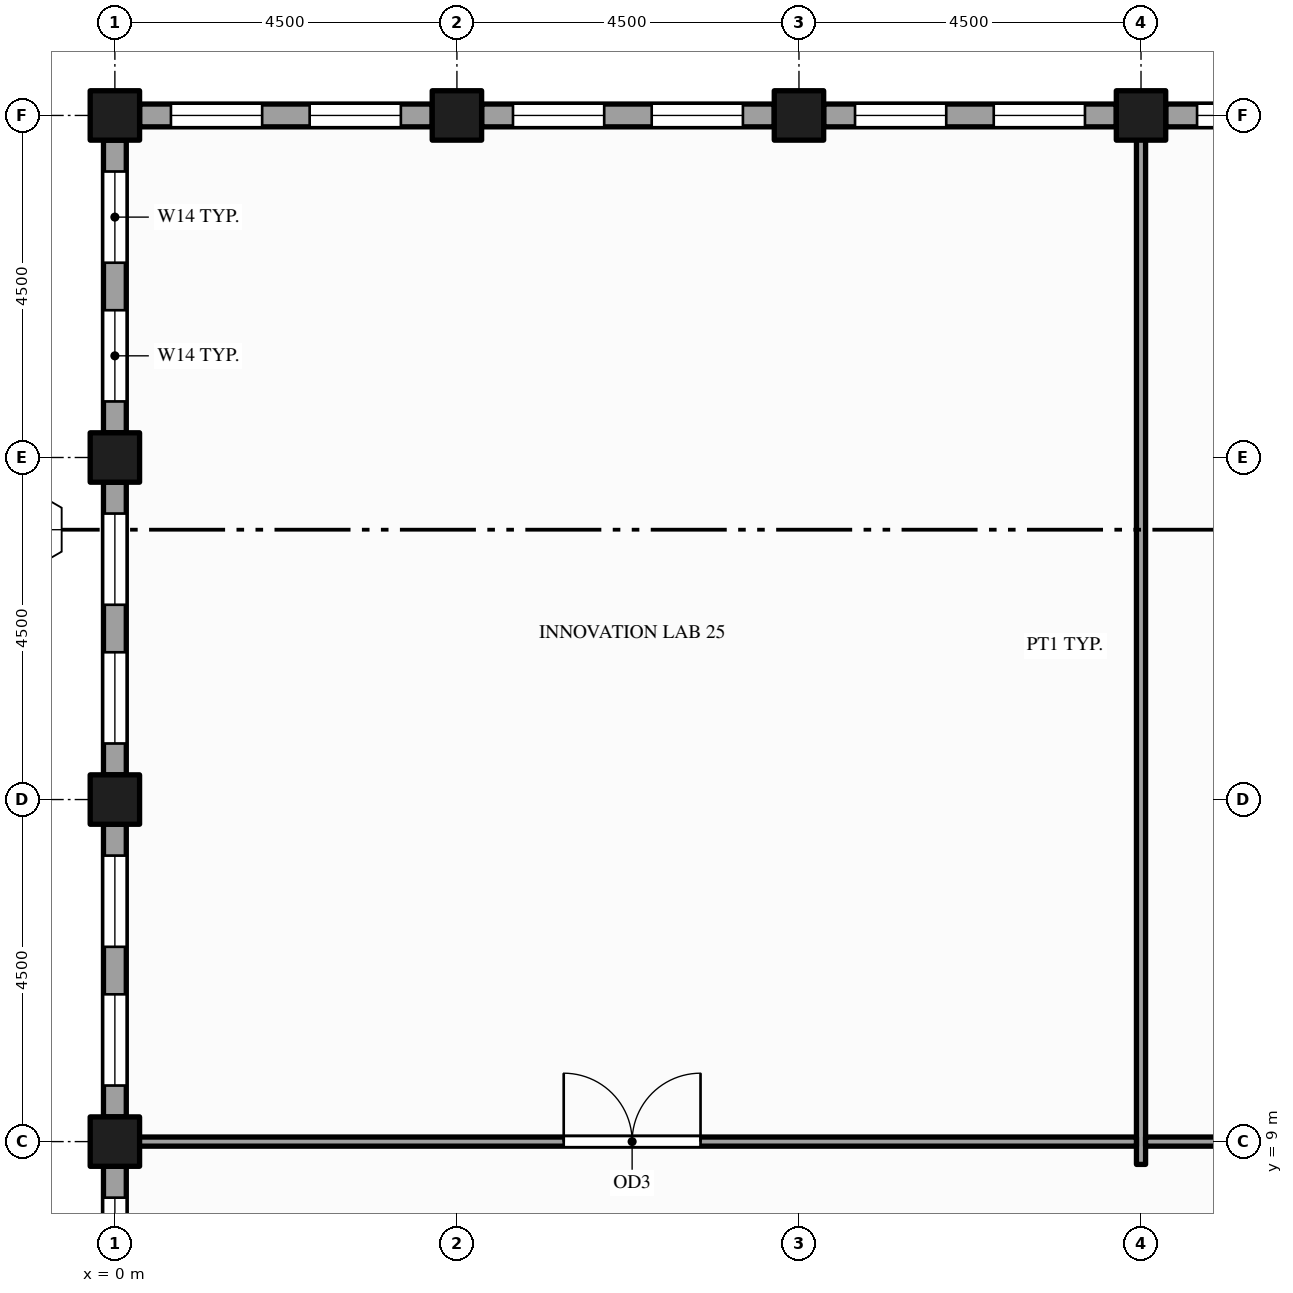
"""IFC4 building model, lengths in metres.
Left out: names, types, materials, properties, quantities, classifications, styles, units other than length and angle.
Written with IfcOpenShell. Run it as: python <this file> out.ifc"""

import sys

from ifc_helpers import new_model, si_unit, direction, frame, frame_2d, origin, origin_2d, place, context, subcontext, project, spatial, rectangle, hollow_rectangle, extrude, element, fill, save


model = new_model("IFC4")
c1 = context("Model", 3, precision=1e-05, world=origin(), true_north=direction((0.0, 1.0)))
c2 = subcontext(c1, "Body", "Model", "MODEL_VIEW")
j1 = project(units=[si_unit("LENGTHUNIT", "METRE"), si_unit("PLANEANGLEUNIT", "RADIAN")], contexts=[c1])
p1 = place(None, origin())
s1 = spatial("IfcSite", under=j1, at=p1, CompositionType="ELEMENT")
p2 = place(p1, origin())
s2 = spatial("IfcBuilding", under=s1, at=p2, CompositionType="ELEMENT")
p3 = place(p2, frame((0.0, 0.0, 273.0)))
s3 = spatial("IfcBuildingStorey", under=s2, at=p3, CompositionType="ELEMENT", Elevation=273.0)
for number, where, z_axis, x_axis in (
    (1, (0.0, 9.0, -0.15), (0.0, 0.0, 1.0), (1.0, 0.0, 0.0)),
    (2, (0.0, 13.5, -0.15), (0.0, 0.0, 1.0), (1.0, 0.0, 0.0)),
    (3, (0.0, 18.0, -0.15), (0.0, 0.0, 1.0), (1.0, 0.0, 0.0)),
    (4, (0.0, 22.5, -0.15), (0.0, 0.0, 1.0), (1.0, 0.0, 0.0)),
    (5, (4.5, 22.5, -0.15), (0.0, 0.0, 1.0), (1.0, 0.0, 0.0)),
    (6, (9.0, 22.5, -0.15), (0.0, 0.0, 1.0), (1.0, 0.0, 0.0)),
    (7, (13.5, 22.5, -0.15), (0.0, 0.0, 1.0), (1.0, 0.0, 0.0)),
):
    element("IfcColumn", number, at=place(p3, frame(where, z_axis=z_axis, x_axis=x_axis)), inside=s3, PredefinedType="COLUMN", context=c2, shape_type="SweptSolid", body=[
        extrude(hollow_rectangle(XDim=0.65, YDim=0.65, WallThickness=0.032, at=origin_2d()), origin(), (0.0, 0.0, 1.0), 4.0),
    ])
p4 = place(p3, frame((17.675, 22.5, 0.0), z_axis=(0.0, 0.0, 1.0), x_axis=(-1.0, 0.0, 0.0)))
e8 = element("IfcWall", 8, at=p4, inside=s3, PredefinedType="STANDARD", context=c2, shape_type="SweptSolid", body=[
    extrude(rectangle(XDim=3.85, YDim=0.3, at=frame_2d((1.925, 0.0))), origin(), (0.0, 0.0, 1.0), 2.87),
])
p5 = place(p4, frame((0.413, 0.0, 0.9)))
e9 = element("IfcOpeningElement", 9, at=p5, cuts=e8, PredefinedType="OPENING", context=c2, shape_type="SweptSolid", body=[
    extrude(rectangle(XDim=1.2, YDim=1.75, at=frame_2d((0.6, 0.875))), frame((0.0, 0.16, 0.0), z_axis=(0.0, -1.0, 0.0), x_axis=(1.0, 0.0, 0.0)), (0.0, 0.0, 1.0), 0.32),
])
p6 = place(p4, frame((2.238, 0.0, 0.9)))
e10 = element("IfcOpeningElement", 10, at=p6, cuts=e8, PredefinedType="OPENING", context=c2, shape_type="SweptSolid", body=[
    extrude(rectangle(XDim=1.2, YDim=1.75, at=frame_2d((0.6, 0.875))), frame((0.0, 0.16, 0.0), z_axis=(0.0, -1.0, 0.0), x_axis=(1.0, 0.0, 0.0)), (0.0, 0.0, 1.0), 0.32),
])
p7 = place(p3, frame((13.175, 22.5, 0.0), z_axis=(0.0, 0.0, 1.0), x_axis=(-1.0, 0.0, 0.0)))
e11 = element("IfcWall", 11, at=p7, inside=s3, PredefinedType="STANDARD", context=c2, shape_type="SweptSolid", body=[
    extrude(rectangle(XDim=3.85, YDim=0.3, at=frame_2d((1.925, 0.0))), origin(), (0.0, 0.0, 1.0), 2.87),
])
p8 = place(p7, frame((0.413, 0.0, 0.9)))
e12 = element("IfcOpeningElement", 12, at=p8, cuts=e11, PredefinedType="OPENING", context=c2, shape_type="SweptSolid", body=[
    extrude(rectangle(XDim=1.2, YDim=1.75, at=frame_2d((0.6, 0.875))), frame((0.0, 0.16, 0.0), z_axis=(0.0, -1.0, 0.0), x_axis=(1.0, 0.0, 0.0)), (0.0, 0.0, 1.0), 0.32),
])
p9 = place(p7, frame((2.238, 0.0, 0.9)))
e13 = element("IfcOpeningElement", 13, at=p9, cuts=e11, PredefinedType="OPENING", context=c2, shape_type="SweptSolid", body=[
    extrude(rectangle(XDim=1.2, YDim=1.75, at=frame_2d((0.6, 0.875))), frame((0.0, 0.16, 0.0), z_axis=(0.0, -1.0, 0.0), x_axis=(1.0, 0.0, 0.0)), (0.0, 0.0, 1.0), 0.32),
])
p10 = place(p3, frame((8.675, 22.5, 0.0), z_axis=(0.0, 0.0, 1.0), x_axis=(-1.0, 0.0, 0.0)))
e14 = element("IfcWall", 14, at=p10, inside=s3, PredefinedType="STANDARD", context=c2, shape_type="SweptSolid", body=[
    extrude(rectangle(XDim=3.85, YDim=0.3, at=frame_2d((1.925, 0.0))), origin(), (0.0, 0.0, 1.0), 2.87),
])
p11 = place(p10, frame((0.413, 0.0, 0.9)))
e15 = element("IfcOpeningElement", 15, at=p11, cuts=e14, PredefinedType="OPENING", context=c2, shape_type="SweptSolid", body=[
    extrude(rectangle(XDim=1.2, YDim=1.75, at=frame_2d((0.6, 0.875))), frame((0.0, 0.16, 0.0), z_axis=(0.0, -1.0, 0.0), x_axis=(1.0, 0.0, 0.0)), (0.0, 0.0, 1.0), 0.32),
])
p12 = place(p10, frame((2.238, 0.0, 0.9)))
e16 = element("IfcOpeningElement", 16, at=p12, cuts=e14, PredefinedType="OPENING", context=c2, shape_type="SweptSolid", body=[
    extrude(rectangle(XDim=1.2, YDim=1.75, at=frame_2d((0.6, 0.875))), frame((0.0, 0.16, 0.0), z_axis=(0.0, -1.0, 0.0), x_axis=(1.0, 0.0, 0.0)), (0.0, 0.0, 1.0), 0.32),
])
p13 = place(p3, frame((4.175, 22.5, 0.0), z_axis=(0.0, 0.0, 1.0), x_axis=(-1.0, 0.0, 0.0)))
e17 = element("IfcWall", 17, at=p13, inside=s3, PredefinedType="STANDARD", context=c2, shape_type="SweptSolid", body=[
    extrude(rectangle(XDim=3.85, YDim=0.3, at=frame_2d((1.925, 0.0))), origin(), (0.0, 0.0, 1.0), 2.87),
])
p14 = place(p13, frame((0.413, 0.0, 0.9)))
e18 = element("IfcOpeningElement", 18, at=p14, cuts=e17, PredefinedType="OPENING", context=c2, shape_type="SweptSolid", body=[
    extrude(rectangle(XDim=1.2, YDim=1.75, at=frame_2d((0.6, 0.875))), frame((0.0, 0.16, 0.0), z_axis=(0.0, -1.0, 0.0), x_axis=(1.0, 0.0, 0.0)), (0.0, 0.0, 1.0), 0.32),
])
p15 = place(p13, frame((2.238, 0.0, 0.9)))
e19 = element("IfcOpeningElement", 19, at=p15, cuts=e17, PredefinedType="OPENING", context=c2, shape_type="SweptSolid", body=[
    extrude(rectangle(XDim=1.2, YDim=1.75, at=frame_2d((0.6, 0.875))), frame((0.0, 0.16, 0.0), z_axis=(0.0, -1.0, 0.0), x_axis=(1.0, 0.0, 0.0)), (0.0, 0.0, 1.0), 0.32),
])
p16 = place(p3, frame((0.0, 22.175, 0.0), z_axis=(0.0, 0.0, 1.0), x_axis=(0.0, -1.0, 0.0)))
e20 = element("IfcWall", 20, at=p16, inside=s3, PredefinedType="STANDARD", context=c2, shape_type="SweptSolid", body=[
    extrude(rectangle(XDim=3.85, YDim=0.3, at=frame_2d((1.925, 0.0))), origin(), (0.0, 0.0, 1.0), 3.162),
])
p17 = place(p16, frame((0.413, 0.0, 0.9)))
e21 = element("IfcOpeningElement", 21, at=p17, cuts=e20, PredefinedType="OPENING", context=c2, shape_type="SweptSolid", body=[
    extrude(rectangle(XDim=1.2, YDim=2.0, at=frame_2d((0.6, 1.0))), frame((0.0, 0.16, 0.0), z_axis=(0.0, -1.0, 0.0), x_axis=(1.0, 0.0, 0.0)), (0.0, 0.0, 1.0), 0.32),
])
p18 = place(p16, frame((2.238, 0.0, 0.9)))
e22 = element("IfcOpeningElement", 22, at=p18, cuts=e20, PredefinedType="OPENING", context=c2, shape_type="SweptSolid", body=[
    extrude(rectangle(XDim=1.2, YDim=2.0, at=frame_2d((0.6, 1.0))), frame((0.0, 0.16, 0.0), z_axis=(0.0, -1.0, 0.0), x_axis=(1.0, 0.0, 0.0)), (0.0, 0.0, 1.0), 0.32),
])
p19 = place(p3, frame((0.0, 17.675, 0.0), z_axis=(0.0, 0.0, 1.0), x_axis=(0.0, -1.0, 0.0)))
e23 = element("IfcWall", 23, at=p19, inside=s3, PredefinedType="STANDARD", context=c2, shape_type="SweptSolid", body=[
    extrude(rectangle(XDim=3.85, YDim=0.3, at=frame_2d((1.925, 0.0))), origin(), (0.0, 0.0, 1.0), 3.162),
])
p20 = place(p19, frame((0.413, 0.0, 0.9)))
e24 = element("IfcOpeningElement", 24, at=p20, cuts=e23, PredefinedType="OPENING", context=c2, shape_type="SweptSolid", body=[
    extrude(rectangle(XDim=1.2, YDim=2.0, at=frame_2d((0.6, 1.0))), frame((0.0, 0.16, 0.0), z_axis=(0.0, -1.0, 0.0), x_axis=(1.0, 0.0, 0.0)), (0.0, 0.0, 1.0), 0.32),
])
p21 = place(p19, frame((2.238, 0.0, 0.9)))
e25 = element("IfcOpeningElement", 25, at=p21, cuts=e23, PredefinedType="OPENING", context=c2, shape_type="SweptSolid", body=[
    extrude(rectangle(XDim=1.2, YDim=2.0, at=frame_2d((0.6, 1.0))), frame((0.0, 0.16, 0.0), z_axis=(0.0, -1.0, 0.0), x_axis=(1.0, 0.0, 0.0)), (0.0, 0.0, 1.0), 0.32),
])
p22 = place(p3, frame((0.0, 13.175, 0.0), z_axis=(0.0, 0.0, 1.0), x_axis=(0.0, -1.0, 0.0)))
e26 = element("IfcWall", 26, at=p22, inside=s3, PredefinedType="STANDARD", context=c2, shape_type="SweptSolid", body=[
    extrude(rectangle(XDim=3.85, YDim=0.3, at=frame_2d((1.925, 0.0))), origin(), (0.0, 0.0, 1.0), 3.162),
])
p23 = place(p22, frame((0.413, 0.0, 0.9)))
e27 = element("IfcOpeningElement", 27, at=p23, cuts=e26, PredefinedType="OPENING", context=c2, shape_type="SweptSolid", body=[
    extrude(rectangle(XDim=1.2, YDim=2.0, at=frame_2d((0.6, 1.0))), frame((0.0, 0.16, 0.0), z_axis=(0.0, -1.0, 0.0), x_axis=(1.0, 0.0, 0.0)), (0.0, 0.0, 1.0), 0.32),
])
p24 = place(p22, frame((2.238, 0.0, 0.9)))
e28 = element("IfcOpeningElement", 28, at=p24, cuts=e26, PredefinedType="OPENING", context=c2, shape_type="SweptSolid", body=[
    extrude(rectangle(XDim=1.2, YDim=2.0, at=frame_2d((0.6, 1.0))), frame((0.0, 0.16, 0.0), z_axis=(0.0, -1.0, 0.0), x_axis=(1.0, 0.0, 0.0)), (0.0, 0.0, 1.0), 0.32),
])
p25 = place(p3, frame((0.0, 8.675, 0.0), z_axis=(0.0, 0.0, 1.0), x_axis=(0.0, -1.0, 0.0)))
e29 = element("IfcWall", 29, at=p25, inside=s3, PredefinedType="STANDARD", context=c2, shape_type="SweptSolid", body=[
    extrude(rectangle(XDim=3.85, YDim=0.3, at=frame_2d((1.925, 0.0))), origin(), (0.0, 0.0, 1.0), 3.162),
])
p26 = place(p25, frame((0.413, 0.0, 0.9)))
e30 = element("IfcOpeningElement", 30, at=p26, cuts=e29, PredefinedType="OPENING", context=c2, shape_type="SweptSolid", body=[
    extrude(rectangle(XDim=1.2, YDim=2.0, at=frame_2d((0.6, 1.0))), frame((0.0, 0.16, 0.0), z_axis=(0.0, -1.0, 0.0), x_axis=(1.0, 0.0, 0.0)), (0.0, 0.0, 1.0), 0.32),
])
p27 = place(p25, frame((2.238, 0.0, 0.9)))
e31 = element("IfcOpeningElement", 31, at=p27, cuts=e29, PredefinedType="OPENING", context=c2, shape_type="SweptSolid", body=[
    extrude(rectangle(XDim=1.2, YDim=2.0, at=frame_2d((0.6, 1.0))), frame((0.0, 0.16, 0.0), z_axis=(0.0, -1.0, 0.0), x_axis=(1.0, 0.0, 0.0)), (0.0, 0.0, 1.0), 0.32),
])
p28 = place(p3, frame((13.5, 8.7, 0.0), z_axis=(0.0, 0.0, 1.0), x_axis=(0.0, 1.0, 0.0)))
e32 = element("IfcWall", 32, at=p28, inside=s3, PredefinedType="PARTITIONING", context=c2, shape_type="SweptSolid", body=[
    extrude(rectangle(XDim=13.65, YDim=0.12, at=frame_2d((6.825, 0.0))), origin(), (0.0, 0.0, 1.0), 2.87),
])
p29 = place(p3, frame((0.15, 9.0, 0.0), z_axis=(0.0, 0.0, 1.0), x_axis=(1.0, 0.0, 0.0)))
e33 = element("IfcWall", 33, at=p29, inside=s3, PredefinedType="PARTITIONING", context=c2, shape_type="SweptSolid", body=[
    extrude(rectangle(XDim=13.29, YDim=0.12, at=frame_2d((6.645, 0.0))), origin(), (0.0, 0.0, 1.0), 2.87),
])
p30 = place(p29, frame((5.755, 0.0, 0.0)))
e34 = element("IfcOpeningElement", 34, at=p30, cuts=e33, PredefinedType="OPENING", context=c2, shape_type="SweptSolid", body=[
    extrude(rectangle(XDim=1.8, YDim=2.1, at=frame_2d((0.9, 1.05))), frame((0.0, 0.07, 0.0), z_axis=(0.0, -1.0, 0.0), x_axis=(1.0, 0.0, 0.0)), (0.0, 0.0, 1.0), 0.14),
])
p31 = place(p3, frame((13.56, 9.0, 0.0), z_axis=(0.0, 0.0, 1.0), x_axis=(1.0, 0.0, 0.0)))
e35 = element("IfcWall", 35, at=p31, inside=s3, PredefinedType="PARTITIONING", context=c2, shape_type="SweptSolid", body=[
    extrude(rectangle(XDim=6.63, YDim=0.12, at=frame_2d((3.315, 0.0))), origin(), (0.0, 0.0, 1.0), 2.87),
])
p32 = place(p31, frame((2.815, 0.0, 0.0)))
e36 = element("IfcOpeningElement", 36, at=p32, cuts=e35, PredefinedType="OPENING", context=c2, shape_type="SweptSolid", body=[
    extrude(rectangle(XDim=1.0, YDim=2.1, at=frame_2d((0.5, 1.05))), frame((0.0, 0.07, 0.0), z_axis=(0.0, -1.0, 0.0), x_axis=(1.0, 0.0, 0.0)), (0.0, 0.0, 1.0), 0.14),
])
p33 = place(p6, origin())
e37 = element("IfcWindow", 37, at=p33, inside=s3, PartitioningType="SINGLE_PANEL", PredefinedType="WINDOW", context=c2, shape_type="SweptSolid", body=[
    extrude(rectangle(XDim=1.2, YDim=1.75, at=frame_2d((0.6, 0.875))), frame((0.0, 0.03, 0.0), z_axis=(0.0, -1.0, 0.0), x_axis=(1.0, 0.0, 0.0)), (0.0, 0.0, 1.0), 0.06),
])
fill(e10, e37)
p34 = place(p8, origin())
e38 = element("IfcWindow", 38, at=p34, inside=s3, PartitioningType="SINGLE_PANEL", PredefinedType="WINDOW", context=c2, shape_type="SweptSolid", body=[
    extrude(rectangle(XDim=1.2, YDim=1.75, at=frame_2d((0.6, 0.875))), frame((0.0, 0.03, 0.0), z_axis=(0.0, -1.0, 0.0), x_axis=(1.0, 0.0, 0.0)), (0.0, 0.0, 1.0), 0.06),
])
fill(e12, e38)
p35 = place(p9, origin())
e39 = element("IfcWindow", 39, at=p35, inside=s3, PartitioningType="SINGLE_PANEL", PredefinedType="WINDOW", context=c2, shape_type="SweptSolid", body=[
    extrude(rectangle(XDim=1.2, YDim=1.75, at=frame_2d((0.6, 0.875))), frame((0.0, 0.03, 0.0), z_axis=(0.0, -1.0, 0.0), x_axis=(1.0, 0.0, 0.0)), (0.0, 0.0, 1.0), 0.06),
])
fill(e13, e39)
p36 = place(p11, origin())
e40 = element("IfcWindow", 40, at=p36, inside=s3, PartitioningType="SINGLE_PANEL", PredefinedType="WINDOW", context=c2, shape_type="SweptSolid", body=[
    extrude(rectangle(XDim=1.2, YDim=1.75, at=frame_2d((0.6, 0.875))), frame((0.0, 0.03, 0.0), z_axis=(0.0, -1.0, 0.0), x_axis=(1.0, 0.0, 0.0)), (0.0, 0.0, 1.0), 0.06),
])
fill(e15, e40)
p37 = place(p12, origin())
e41 = element("IfcWindow", 41, at=p37, inside=s3, PartitioningType="SINGLE_PANEL", PredefinedType="WINDOW", context=c2, shape_type="SweptSolid", body=[
    extrude(rectangle(XDim=1.2, YDim=1.75, at=frame_2d((0.6, 0.875))), frame((0.0, 0.03, 0.0), z_axis=(0.0, -1.0, 0.0), x_axis=(1.0, 0.0, 0.0)), (0.0, 0.0, 1.0), 0.06),
])
fill(e16, e41)
p38 = place(p14, origin())
e42 = element("IfcWindow", 42, at=p38, inside=s3, PartitioningType="SINGLE_PANEL", PredefinedType="WINDOW", context=c2, shape_type="SweptSolid", body=[
    extrude(rectangle(XDim=1.2, YDim=1.75, at=frame_2d((0.6, 0.875))), frame((0.0, 0.03, 0.0), z_axis=(0.0, -1.0, 0.0), x_axis=(1.0, 0.0, 0.0)), (0.0, 0.0, 1.0), 0.06),
])
fill(e18, e42)
p39 = place(p15, origin())
e43 = element("IfcWindow", 43, at=p39, inside=s3, PartitioningType="SINGLE_PANEL", PredefinedType="WINDOW", context=c2, shape_type="SweptSolid", body=[
    extrude(rectangle(XDim=1.2, YDim=1.75, at=frame_2d((0.6, 0.875))), frame((0.0, 0.03, 0.0), z_axis=(0.0, -1.0, 0.0), x_axis=(1.0, 0.0, 0.0)), (0.0, 0.0, 1.0), 0.06),
])
fill(e19, e43)
p40 = place(p17, origin())
e44 = element("IfcWindow", 44, at=p40, inside=s3, PartitioningType="SINGLE_PANEL", PredefinedType="WINDOW", context=c2, shape_type="SweptSolid", body=[
    extrude(rectangle(XDim=1.2, YDim=2.0, at=frame_2d((0.6, 1.0))), frame((0.0, 0.03, 0.0), z_axis=(0.0, -1.0, 0.0), x_axis=(1.0, 0.0, 0.0)), (0.0, 0.0, 1.0), 0.06),
])
fill(e21, e44)
p41 = place(p18, origin())
e45 = element("IfcWindow", 45, at=p41, inside=s3, PartitioningType="SINGLE_PANEL", PredefinedType="WINDOW", context=c2, shape_type="SweptSolid", body=[
    extrude(rectangle(XDim=1.2, YDim=2.0, at=frame_2d((0.6, 1.0))), frame((0.0, 0.03, 0.0), z_axis=(0.0, -1.0, 0.0), x_axis=(1.0, 0.0, 0.0)), (0.0, 0.0, 1.0), 0.06),
])
fill(e22, e45)
p42 = place(p20, origin())
e46 = element("IfcWindow", 46, at=p42, inside=s3, PartitioningType="SINGLE_PANEL", PredefinedType="WINDOW", context=c2, shape_type="SweptSolid", body=[
    extrude(rectangle(XDim=1.2, YDim=2.0, at=frame_2d((0.6, 1.0))), frame((0.0, 0.03, 0.0), z_axis=(0.0, -1.0, 0.0), x_axis=(1.0, 0.0, 0.0)), (0.0, 0.0, 1.0), 0.06),
])
fill(e24, e46)
p43 = place(p21, origin())
e47 = element("IfcWindow", 47, at=p43, inside=s3, PartitioningType="SINGLE_PANEL", PredefinedType="WINDOW", context=c2, shape_type="SweptSolid", body=[
    extrude(rectangle(XDim=1.2, YDim=2.0, at=frame_2d((0.6, 1.0))), frame((0.0, 0.03, 0.0), z_axis=(0.0, -1.0, 0.0), x_axis=(1.0, 0.0, 0.0)), (0.0, 0.0, 1.0), 0.06),
])
fill(e25, e47)
p44 = place(p23, origin())
e48 = element("IfcWindow", 48, at=p44, inside=s3, PartitioningType="SINGLE_PANEL", PredefinedType="WINDOW", context=c2, shape_type="SweptSolid", body=[
    extrude(rectangle(XDim=1.2, YDim=2.0, at=frame_2d((0.6, 1.0))), frame((0.0, 0.03, 0.0), z_axis=(0.0, -1.0, 0.0), x_axis=(1.0, 0.0, 0.0)), (0.0, 0.0, 1.0), 0.06),
])
fill(e27, e48)
p45 = place(p24, origin())
e49 = element("IfcWindow", 49, at=p45, inside=s3, PartitioningType="SINGLE_PANEL", PredefinedType="WINDOW", context=c2, shape_type="SweptSolid", body=[
    extrude(rectangle(XDim=1.2, YDim=2.0, at=frame_2d((0.6, 1.0))), frame((0.0, 0.03, 0.0), z_axis=(0.0, -1.0, 0.0), x_axis=(1.0, 0.0, 0.0)), (0.0, 0.0, 1.0), 0.06),
])
fill(e28, e49)
p46 = place(p26, origin())
e50 = element("IfcWindow", 50, at=p46, inside=s3, PartitioningType="SINGLE_PANEL", PredefinedType="WINDOW", context=c2, shape_type="SweptSolid", body=[
    extrude(rectangle(XDim=1.2, YDim=2.0, at=frame_2d((0.6, 1.0))), frame((0.0, 0.03, 0.0), z_axis=(0.0, -1.0, 0.0), x_axis=(1.0, 0.0, 0.0)), (0.0, 0.0, 1.0), 0.06),
])
fill(e30, e50)
p47 = place(p30, origin())
e51 = element("IfcDoor", 51, at=p47, inside=s3, OperationType="DOUBLE_DOOR_SINGLE_SWING", PredefinedType="DOOR", context=c2, shape_type="SweptSolid", body=[
    extrude(rectangle(XDim=1.8, YDim=2.1, at=frame_2d((0.9, 1.05))), frame((0.0, 0.025, 0.0), z_axis=(0.0, -1.0, 0.0), x_axis=(1.0, 0.0, 0.0)), (0.0, 0.0, 1.0), 0.05),
])
fill(e34, e51)
save(model, sys.argv[1])
